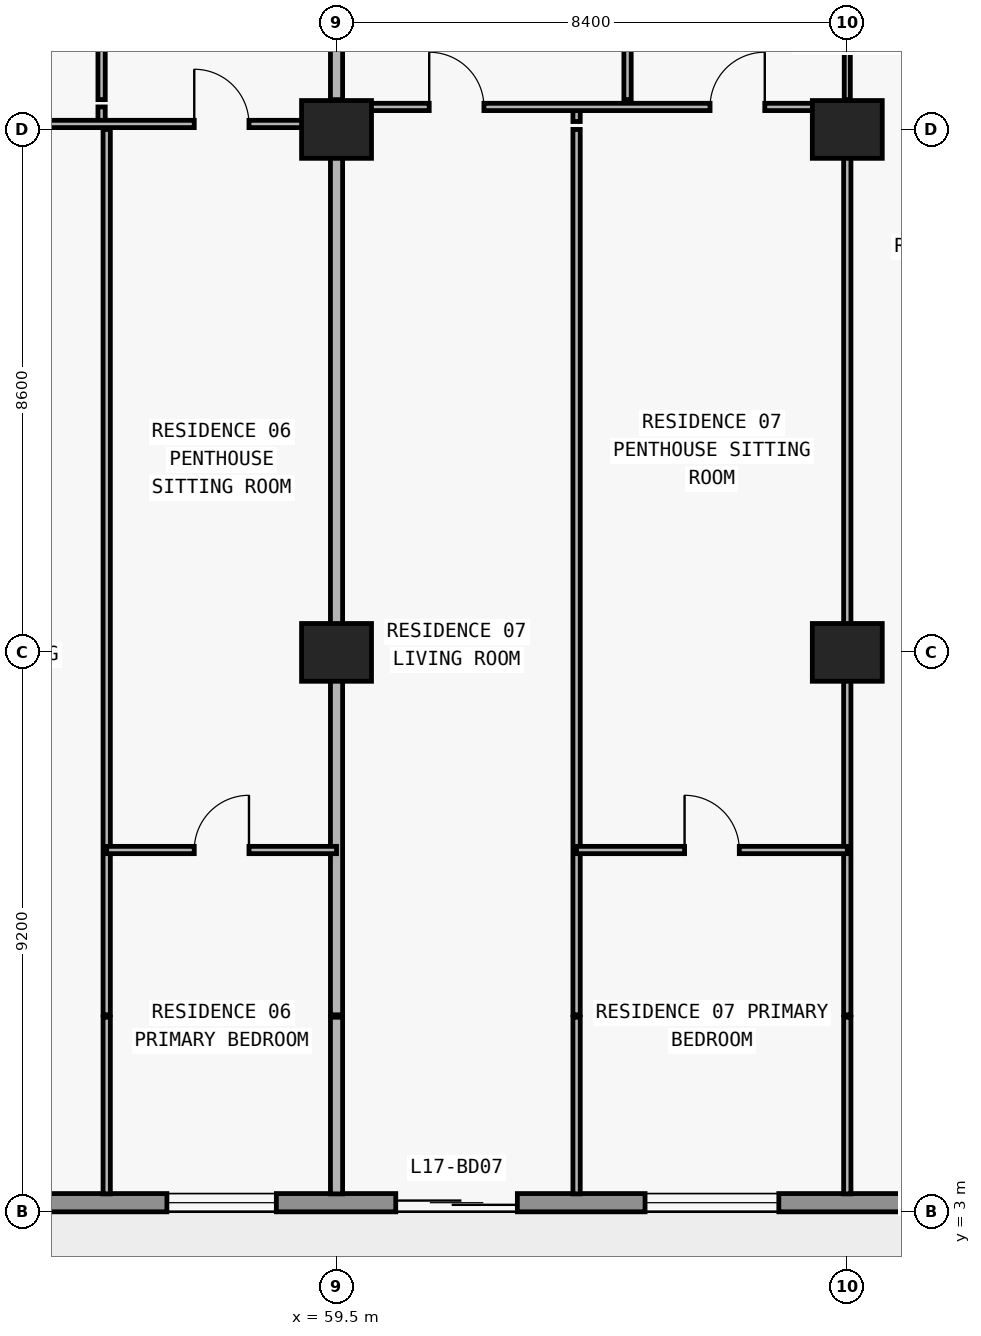
"""IFC4 building model, lengths in metres.
Left out: names, types, materials, properties, quantities, classifications, styles, units other than length and angle.
Written with IfcOpenShell. Run it as: python <this file> out.ifc"""

import sys

from ifc_helpers import new_model, si_unit, direction, frame, frame_2d, origin, origin_2d, place, context, subcontext, project, spatial, rectangle, extrude, element, fill, save


model = new_model("IFC4")
c1 = context("Model", 3, precision=1e-05, world=origin(), true_north=direction((0.0, 1.0)))
c2 = subcontext(c1, "Body", "Model", "MODEL_VIEW")
j1 = project(units=[si_unit("LENGTHUNIT", "METRE"), si_unit("PLANEANGLEUNIT", "RADIAN")], contexts=[c1])
p1 = place(None, origin())
s1 = spatial("IfcSite", under=j1, at=p1, CompositionType="ELEMENT")
p2 = place(p1, origin())
s2 = spatial("IfcBuilding", under=s1, at=p2, CompositionType="ELEMENT")
p3 = place(p2, frame((0.0, 0.0, 66.3)))
s3 = spatial("IfcBuildingStorey", under=s2, at=p3, CompositionType="ELEMENT", Elevation=66.3)
for number, where, z_axis, x_axis in (
    (1, (59.5, 12.2, 0.0), (0.0, 0.0, 1.0), (1.0, 0.0, 0.0)),
    (2, (67.9, 12.2, 0.0), (0.0, 0.0, 1.0), (1.0, 0.0, 0.0)),
    (3, (59.5, 20.8, 0.0), (0.0, 0.0, 1.0), (1.0, 0.0, 0.0)),
    (4, (67.9, 20.8, 0.0), (0.0, 0.0, 1.0), (1.0, 0.0, 0.0)),
):
    element("IfcColumn", number, at=place(p3, frame(where, z_axis=z_axis, x_axis=x_axis)), inside=s3, PredefinedType="COLUMN", context=c2, shape_type="SweptSolid", body=[
        extrude(rectangle(XDim=1.15, YDim=0.95, at=origin_2d()), origin(), (0.0, 0.0, 1.0), 3.05),
    ])
p4 = place(p3, frame((72.7, 3.15, 0.0), z_axis=(0.0, 0.0, 1.0), x_axis=(-1.0, 0.0, 0.0)))
e5 = element("IfcWall", 5, at=p4, inside=s3, PredefinedType="STANDARD", context=c2, shape_type="SweptSolid", body=[
    extrude(rectangle(XDim=67.6, YDim=0.3, at=frame_2d((33.8, 0.0))), origin(), (0.0, 0.0, 1.0), 3.05),
])
p5 = place(p4, frame((59.826, 0.0, 0.0)))
e6 = element("IfcOpeningElement", 6, at=p5, cuts=e5, PredefinedType="OPENING", context=c2, shape_type="SweptSolid", body=[
    extrude(rectangle(XDim=2.0, YDim=2.3, at=frame_2d((1.0, 1.15))), frame((0.0, 0.16, 0.0), z_axis=(0.0, -1.0, 0.0), x_axis=(1.0, 0.0, 0.0)), (0.0, 0.0, 1.0), 0.32),
])
p6 = place(p4, frame((55.526, 0.0, 0.85)))
e7 = element("IfcOpeningElement", 7, at=p6, cuts=e5, PredefinedType="OPENING", context=c2, shape_type="SweptSolid", body=[
    extrude(rectangle(XDim=2.2, YDim=1.55, at=frame_2d((1.1, 0.775))), frame((0.0, 0.16, 0.0), z_axis=(0.0, -1.0, 0.0), x_axis=(1.0, 0.0, 0.0)), (0.0, 0.0, 1.0), 0.32),
])
p7 = place(p4, frame((51.09, 0.0, 0.0)))
e8 = element("IfcOpeningElement", 8, at=p7, cuts=e5, PredefinedType="OPENING", context=c2, shape_type="SweptSolid", body=[
    extrude(rectangle(XDim=2.0, YDim=2.3, at=frame_2d((1.0, 1.15))), frame((0.0, 0.16, 0.0), z_axis=(0.0, -1.0, 0.0), x_axis=(1.0, 0.0, 0.0)), (0.0, 0.0, 1.0), 0.32),
])
p8 = place(p4, frame((46.99, 0.0, 0.85)))
e9 = element("IfcOpeningElement", 9, at=p8, cuts=e5, PredefinedType="OPENING", context=c2, shape_type="SweptSolid", body=[
    extrude(rectangle(XDim=1.8, YDim=1.55, at=frame_2d((0.9, 0.775))), frame((0.0, 0.16, 0.0), z_axis=(0.0, -1.0, 0.0), x_axis=(1.0, 0.0, 0.0)), (0.0, 0.0, 1.0), 0.32),
])
p9 = place(p4, frame((43.026, 0.0, 0.0)))
e10 = element("IfcOpeningElement", 10, at=p9, cuts=e5, PredefinedType="OPENING", context=c2, shape_type="SweptSolid", body=[
    extrude(rectangle(XDim=2.0, YDim=2.3, at=frame_2d((1.0, 1.15))), frame((0.0, 0.16, 0.0), z_axis=(0.0, -1.0, 0.0), x_axis=(1.0, 0.0, 0.0)), (0.0, 0.0, 1.0), 0.32),
])
p10 = place(p4, frame((38.726, 0.0, 0.85)))
e11 = element("IfcOpeningElement", 11, at=p10, cuts=e5, PredefinedType="OPENING", context=c2, shape_type="SweptSolid", body=[
    extrude(rectangle(XDim=2.2, YDim=1.55, at=frame_2d((1.1, 0.775))), frame((0.0, 0.16, 0.0), z_axis=(0.0, -1.0, 0.0), x_axis=(1.0, 0.0, 0.0)), (0.0, 0.0, 1.0), 0.32),
])
p11 = place(p4, frame((34.51, 0.0, 0.0)))
e12 = element("IfcOpeningElement", 12, at=p11, cuts=e5, PredefinedType="OPENING", context=c2, shape_type="SweptSolid", body=[
    extrude(rectangle(XDim=2.0, YDim=2.3, at=frame_2d((1.0, 1.15))), frame((0.0, 0.16, 0.0), z_axis=(0.0, -1.0, 0.0), x_axis=(1.0, 0.0, 0.0)), (0.0, 0.0, 1.0), 0.32),
])
p12 = place(p4, frame((30.81, 0.0, 0.85)))
e13 = element("IfcOpeningElement", 13, at=p12, cuts=e5, PredefinedType="OPENING", context=c2, shape_type="SweptSolid", body=[
    extrude(rectangle(XDim=1.8, YDim=1.55, at=frame_2d((0.9, 0.775))), frame((0.0, 0.16, 0.0), z_axis=(0.0, -1.0, 0.0), x_axis=(1.0, 0.0, 0.0)), (0.0, 0.0, 1.0), 0.32),
])
p13 = place(p4, frame((27.026, 0.0, 0.0)))
e14 = element("IfcOpeningElement", 14, at=p13, cuts=e5, PredefinedType="OPENING", context=c2, shape_type="SweptSolid", body=[
    extrude(rectangle(XDim=2.0, YDim=2.3, at=frame_2d((1.0, 1.15))), frame((0.0, 0.16, 0.0), z_axis=(0.0, -1.0, 0.0), x_axis=(1.0, 0.0, 0.0)), (0.0, 0.0, 1.0), 0.32),
])
p14 = place(p4, frame((22.726, 0.0, 0.85)))
e15 = element("IfcOpeningElement", 15, at=p14, cuts=e5, PredefinedType="OPENING", context=c2, shape_type="SweptSolid", body=[
    extrude(rectangle(XDim=2.2, YDim=1.55, at=frame_2d((1.1, 0.775))), frame((0.0, 0.16, 0.0), z_axis=(0.0, -1.0, 0.0), x_axis=(1.0, 0.0, 0.0)), (0.0, 0.0, 1.0), 0.32),
])
p15 = place(p4, frame((18.29, 0.0, 0.0)))
e16 = element("IfcOpeningElement", 16, at=p15, cuts=e5, PredefinedType="OPENING", context=c2, shape_type="SweptSolid", body=[
    extrude(rectangle(XDim=2.0, YDim=2.3, at=frame_2d((1.0, 1.15))), frame((0.0, 0.16, 0.0), z_axis=(0.0, -1.0, 0.0), x_axis=(1.0, 0.0, 0.0)), (0.0, 0.0, 1.0), 0.32),
])
p16 = place(p4, frame((14.19, 0.0, 0.85)))
e17 = element("IfcOpeningElement", 17, at=p16, cuts=e5, PredefinedType="OPENING", context=c2, shape_type="SweptSolid", body=[
    extrude(rectangle(XDim=1.8, YDim=1.55, at=frame_2d((0.9, 0.775))), frame((0.0, 0.16, 0.0), z_axis=(0.0, -1.0, 0.0), x_axis=(1.0, 0.0, 0.0)), (0.0, 0.0, 1.0), 0.32),
])
p17 = place(p4, frame((10.226, 0.0, 0.0)))
e18 = element("IfcOpeningElement", 18, at=p17, cuts=e5, PredefinedType="OPENING", context=c2, shape_type="SweptSolid", body=[
    extrude(rectangle(XDim=2.0, YDim=2.3, at=frame_2d((1.0, 1.15))), frame((0.0, 0.16, 0.0), z_axis=(0.0, -1.0, 0.0), x_axis=(1.0, 0.0, 0.0)), (0.0, 0.0, 1.0), 0.32),
])
p18 = place(p4, frame((5.926, 0.0, 0.85)))
e19 = element("IfcOpeningElement", 19, at=p18, cuts=e5, PredefinedType="OPENING", context=c2, shape_type="SweptSolid", body=[
    extrude(rectangle(XDim=2.2, YDim=1.55, at=frame_2d((1.1, 0.775))), frame((0.0, 0.16, 0.0), z_axis=(0.0, -1.0, 0.0), x_axis=(1.0, 0.0, 0.0)), (0.0, 0.0, 1.0), 0.32),
])
p19 = place(p3, frame((55.636, 20.93, 0.0), z_axis=(0.0, 0.0, 1.0), x_axis=(0.0, 1.0, 0.0)))
e20 = element("IfcWall", 20, at=p19, inside=s3, PredefinedType="PARTITIONING", context=c2, shape_type="SweptSolid", body=[
    extrude(rectangle(XDim=0.24, YDim=0.12, at=frame_2d((0.12, 0.0))), origin(), (0.0, 0.0, 1.0), 3.05),
])
p20 = place(p3, frame((55.636, 21.29, 0.0), z_axis=(0.0, 0.0, 1.0), x_axis=(0.0, 1.0, 0.0)))
e21 = element("IfcWall", 21, at=p20, inside=s3, PredefinedType="PARTITIONING", context=c2, shape_type="SweptSolid", body=[
    extrude(rectangle(XDim=4.69, YDim=0.12, at=frame_2d((2.345, 0.0))), origin(), (0.0, 0.0, 1.0), 3.05),
])
p21 = place(p20, frame((1.895, 0.0, 0.0)))
e22 = element("IfcOpeningElement", 22, at=p21, cuts=e21, PredefinedType="OPENING", context=c2, shape_type="SweptSolid", body=[
    extrude(rectangle(XDim=0.9, YDim=2.15, at=frame_2d((0.45, 1.075))), frame((0.0, 0.07, 0.0), z_axis=(0.0, -1.0, 0.0), x_axis=(1.0, 0.0, 0.0)), (0.0, 0.0, 1.0), 0.14),
])
p22 = place(p3, frame((55.72, 3.295, 0.0), z_axis=(0.0, 0.0, 1.0), x_axis=(0.0, 1.0, 0.0)))
e23 = element("IfcWall", 23, at=p22, inside=s3, PredefinedType="PARTITIONING", context=c2, shape_type="SweptSolid", body=[
    extrude(rectangle(XDim=2.905, YDim=0.12, at=frame_2d((1.453, 0.0))), origin(), (0.0, 0.0, 1.0), 3.05),
])
p23 = place(p3, frame((55.72, 6.24, 0.0), z_axis=(0.0, 0.0, 1.0), x_axis=(0.0, 1.0, 0.0)))
e24 = element("IfcWall", 24, at=p23, inside=s3, PredefinedType="PARTITIONING", context=c2, shape_type="SweptSolid", body=[
    extrude(rectangle(XDim=14.56, YDim=0.12, at=frame_2d((7.28, 0.0))), origin(), (0.0, 0.0, 1.0), 3.05),
])
p24 = place(p3, frame((59.5, 3.295, 0.0), z_axis=(0.0, 0.0, 1.0), x_axis=(0.0, 1.0, 0.0)))
e25 = element("IfcWall", 25, at=p24, inside=s3, PredefinedType="PARTITIONING", context=c2, shape_type="SweptSolid", body=[
    extrude(rectangle(XDim=2.905, YDim=0.2, at=frame_2d((1.453, 0.0))), origin(), (0.0, 0.0, 1.0), 3.05),
])
p25 = place(p3, frame((59.5, 6.24, 0.0), z_axis=(0.0, 0.0, 1.0), x_axis=(0.0, 1.0, 0.0)))
e26 = element("IfcWall", 26, at=p25, inside=s3, PredefinedType="PARTITIONING", context=c2, shape_type="SweptSolid", body=[
    extrude(rectangle(XDim=14.56, YDim=0.2, at=frame_2d((7.28, 0.0))), origin(), (0.0, 0.0, 1.0), 2.11),
])
p26 = place(p3, frame((59.5, 20.93, 0.0), z_axis=(0.0, 0.0, 1.0), x_axis=(0.0, 1.0, 0.0)))
e27 = element("IfcWall", 27, at=p26, inside=s3, PredefinedType="PARTITIONING", context=c2, shape_type="SweptSolid", body=[
    extrude(rectangle(XDim=0.24, YDim=0.2, at=frame_2d((0.12, 0.0))), origin(), (0.0, 0.0, 1.0), 3.05),
])
p27 = place(p3, frame((59.5, 21.29, 0.0), z_axis=(0.0, 0.0, 1.0), x_axis=(0.0, 1.0, 0.0)))
e28 = element("IfcWall", 28, at=p27, inside=s3, PredefinedType="PARTITIONING", context=c2, shape_type="SweptSolid", body=[
    extrude(rectangle(XDim=4.69, YDim=0.2, at=frame_2d((2.345, 0.0))), origin(), (0.0, 0.0, 1.0), 2.11),
])
p28 = place(p3, frame((63.448, 3.295, 0.0), z_axis=(0.0, 0.0, 1.0), x_axis=(0.0, 1.0, 0.0)))
e29 = element("IfcWall", 29, at=p28, inside=s3, PredefinedType="PARTITIONING", context=c2, shape_type="SweptSolid", body=[
    extrude(rectangle(XDim=2.905, YDim=0.12, at=frame_2d((1.453, 0.0))), origin(), (0.0, 0.0, 1.0), 3.05),
])
p29 = place(p3, frame((63.448, 6.24, 0.0), z_axis=(0.0, 0.0, 1.0), x_axis=(0.0, 1.0, 0.0)))
e30 = element("IfcWall", 30, at=p29, inside=s3, PredefinedType="PARTITIONING", context=c2, shape_type="SweptSolid", body=[
    extrude(rectangle(XDim=14.56, YDim=0.12, at=frame_2d((7.28, 0.0))), origin(), (0.0, 0.0, 1.0), 2.423),
])
p30 = place(p3, frame((63.448, 20.93, 0.0), z_axis=(0.0, 0.0, 1.0), x_axis=(0.0, 1.0, 0.0)))
e31 = element("IfcWall", 31, at=p30, inside=s3, PredefinedType="PARTITIONING", context=c2, shape_type="SweptSolid", body=[
    extrude(rectangle(XDim=0.24, YDim=0.12, at=frame_2d((0.12, 0.0))), origin(), (0.0, 0.0, 1.0), 2.423),
])
p31 = place(p3, frame((64.286, 21.29, 0.0), z_axis=(0.0, 0.0, 1.0), x_axis=(0.0, 1.0, 0.0)))
e32 = element("IfcWall", 32, at=p31, inside=s3, PredefinedType="PARTITIONING", context=c2, shape_type="SweptSolid", body=[
    extrude(rectangle(XDim=4.69, YDim=0.12, at=frame_2d((2.345, 0.0))), origin(), (0.0, 0.0, 1.0), 3.05),
])
p32 = place(p31, frame((1.895, 0.0, 0.0)))
e33 = element("IfcOpeningElement", 33, at=p32, cuts=e32, PredefinedType="OPENING", context=c2, shape_type="SweptSolid", body=[
    extrude(rectangle(XDim=0.9, YDim=2.15, at=frame_2d((0.45, 1.075))), frame((0.0, 0.07, 0.0), z_axis=(0.0, -1.0, 0.0), x_axis=(1.0, 0.0, 0.0)), (0.0, 0.0, 1.0), 0.14),
])
p33 = place(p3, frame((67.9, 3.295, 0.0), z_axis=(0.0, 0.0, 1.0), x_axis=(0.0, 1.0, 0.0)))
e34 = element("IfcWall", 34, at=p33, inside=s3, PredefinedType="PARTITIONING", context=c2, shape_type="SweptSolid", body=[
    extrude(rectangle(XDim=2.905, YDim=0.12, at=frame_2d((1.453, 0.0))), origin(), (0.0, 0.0, 1.0), 3.05),
])
p34 = place(p3, frame((67.9, 6.24, 0.0), z_axis=(0.0, 0.0, 1.0), x_axis=(0.0, 1.0, 0.0)))
e35 = element("IfcWall", 35, at=p34, inside=s3, PredefinedType="PARTITIONING", context=c2, shape_type="SweptSolid", body=[
    extrude(rectangle(XDim=14.56, YDim=0.12, at=frame_2d((7.28, 0.0))), origin(), (0.0, 0.0, 1.0), 2.11),
])
p35 = place(p3, frame((67.9, 20.93, 0.0), z_axis=(0.0, 0.0, 1.0), x_axis=(0.0, 1.0, 0.0)))
e36 = element("IfcWall", 36, at=p35, inside=s3, PredefinedType="PARTITIONING", context=c2, shape_type="SweptSolid", body=[
    extrude(rectangle(XDim=0.24, YDim=0.12, at=frame_2d((0.12, 0.0))), origin(), (0.0, 0.0, 1.0), 3.05),
])
p36 = place(p3, frame((67.9, 21.29, 0.0), z_axis=(0.0, 0.0, 1.0), x_axis=(0.0, 1.0, 0.0)))
e37 = element("IfcWall", 37, at=p36, inside=s3, PredefinedType="MOVABLE", context=c2, shape_type="SweptSolid", body=[
    extrude(rectangle(XDim=4.69, YDim=0.1, at=frame_2d((2.345, 0.0))), origin(), (0.0, 0.0, 1.0), 2.11),
])
p37 = place(p36, frame((1.895, 0.0, 0.0)))
e38 = element("IfcOpeningElement", 38, at=p37, cuts=e37, PredefinedType="OPENING", context=c2, shape_type="SweptSolid", body=[
    extrude(rectangle(XDim=0.9, YDim=2.06, at=frame_2d((0.45, 1.03))), frame((0.0, 0.06, 0.0), z_axis=(0.0, -1.0, 0.0), x_axis=(1.0, 0.0, 0.0)), (0.0, 0.0, 1.0), 0.12),
])
p38 = place(p3, frame((55.72, 8.95, 0.0), z_axis=(0.0, 0.0, 1.0), x_axis=(1.0, 0.0, 0.0)))
e39 = element("IfcWall", 39, at=p38, inside=s3, PredefinedType="PARTITIONING", context=c2, shape_type="SweptSolid", body=[
    extrude(rectangle(XDim=3.78, YDim=0.12, at=frame_2d((1.89, 0.0))), origin(), (0.0, 0.0, 1.0), 3.05),
])
p39 = place(p38, frame((1.44, 0.0, 0.0)))
e40 = element("IfcOpeningElement", 40, at=p39, cuts=e39, PredefinedType="OPENING", context=c2, shape_type="SweptSolid", body=[
    extrude(rectangle(XDim=0.9, YDim=2.15, at=frame_2d((0.45, 1.075))), frame((0.0, 0.07, 0.0), z_axis=(0.0, -1.0, 0.0), x_axis=(1.0, 0.0, 0.0)), (0.0, 0.0, 1.0), 0.14),
])
p40 = place(p3, frame((63.448, 8.95, 0.0), z_axis=(0.0, 0.0, 1.0), x_axis=(1.0, 0.0, 0.0)))
e41 = element("IfcWall", 41, at=p40, inside=s3, PredefinedType="PARTITIONING", context=c2, shape_type="SweptSolid", body=[
    extrude(rectangle(XDim=4.452, YDim=0.12, at=frame_2d((2.226, 0.0))), origin(), (0.0, 0.0, 1.0), 3.05),
])
p41 = place(p40, frame((1.776, 0.0, 0.0)))
e42 = element("IfcOpeningElement", 42, at=p41, cuts=e41, PredefinedType="OPENING", context=c2, shape_type="SweptSolid", body=[
    extrude(rectangle(XDim=0.9, YDim=2.15, at=frame_2d((0.45, 1.075))), frame((0.0, 0.07, 0.0), z_axis=(0.0, -1.0, 0.0), x_axis=(1.0, 0.0, 0.0)), (0.0, 0.0, 1.0), 0.14),
])
p42 = place(p3, frame((51.37, 20.89, 0.0), z_axis=(0.0, 0.0, 1.0), x_axis=(1.0, 0.0, 0.0)))
e43 = element("IfcWall", 43, at=p42, inside=s3, PredefinedType="PARTITIONING", context=c2, shape_type="SweptSolid", body=[
    extrude(rectangle(XDim=8.13, YDim=0.12, at=frame_2d((4.065, 0.0))), origin(), (0.0, 0.0, 1.0), 2.11),
])
p43 = place(p42, frame((1.683, 0.0, 0.0)))
e44 = element("IfcOpeningElement", 44, at=p43, cuts=e43, PredefinedType="OPENING", context=c2, shape_type="SweptSolid", body=[
    extrude(rectangle(XDim=0.9, YDim=2.06, at=frame_2d((0.45, 1.03))), frame((0.0, 0.07, 0.0), z_axis=(0.0, -1.0, 0.0), x_axis=(1.0, 0.0, 0.0)), (0.0, 0.0, 1.0), 0.14),
])
p44 = place(p42, frame((5.79, 0.0, 0.0)))
e45 = element("IfcOpeningElement", 45, at=p44, cuts=e43, PredefinedType="OPENING", context=c2, shape_type="SweptSolid", body=[
    extrude(rectangle(XDim=0.9, YDim=2.06, at=frame_2d((0.45, 1.03))), frame((0.0, 0.07, 0.0), z_axis=(0.0, -1.0, 0.0), x_axis=(1.0, 0.0, 0.0)), (0.0, 0.0, 1.0), 0.14),
])
p45 = place(p3, frame((59.5, 21.17, 0.0), z_axis=(0.0, 0.0, 1.0), x_axis=(1.0, 0.0, 0.0)))
e46 = element("IfcWall", 46, at=p45, inside=s3, PredefinedType="PARTITIONING", context=c2, shape_type="SweptSolid", body=[
    extrude(rectangle(XDim=8.4, YDim=0.12, at=frame_2d((4.2, 0.0))), origin(), (0.0, 0.0, 1.0), 3.05),
])
p46 = place(p45, frame((1.524, 0.0, 0.0)))
e47 = element("IfcOpeningElement", 47, at=p46, cuts=e46, PredefinedType="OPENING", context=c2, shape_type="SweptSolid", body=[
    extrude(rectangle(XDim=0.9, YDim=2.15, at=frame_2d((0.45, 1.075))), frame((0.0, 0.07, 0.0), z_axis=(0.0, -1.0, 0.0), x_axis=(1.0, 0.0, 0.0)), (0.0, 0.0, 1.0), 0.14),
])
p47 = place(p45, frame((6.143, 0.0, 0.0)))
e48 = element("IfcOpeningElement", 48, at=p47, cuts=e46, PredefinedType="OPENING", context=c2, shape_type="SweptSolid", body=[
    extrude(rectangle(XDim=0.9, YDim=2.15, at=frame_2d((0.45, 1.075))), frame((0.0, 0.07, 0.0), z_axis=(0.0, -1.0, 0.0), x_axis=(1.0, 0.0, 0.0)), (0.0, 0.0, 1.0), 0.14),
])
p48 = place(p16, origin())
e49 = element("IfcWindow", 49, at=p48, inside=s3, PartitioningType="SINGLE_PANEL", PredefinedType="WINDOW", context=c2, shape_type="SweptSolid", body=[
    extrude(rectangle(XDim=1.8, YDim=1.55, at=frame_2d((0.9, 0.775))), frame((0.0, 0.03, 0.0), z_axis=(0.0, -1.0, 0.0), x_axis=(1.0, 0.0, 0.0)), (0.0, 0.0, 1.0), 0.06),
])
fill(e17, e49)
p49 = place(p17, origin())
e50 = element("IfcDoor", 50, at=p49, inside=s3, OperationType="DOUBLE_DOOR_SLIDING", PredefinedType="DOOR", context=c2, shape_type="SweptSolid", body=[
    extrude(rectangle(XDim=2.0, YDim=2.3, at=frame_2d((1.0, 1.15))), frame((0.0, 0.025, 0.0), z_axis=(0.0, -1.0, 0.0), x_axis=(1.0, 0.0, 0.0)), (0.0, 0.0, 1.0), 0.05),
])
fill(e18, e50)
p50 = place(p18, origin())
e51 = element("IfcWindow", 51, at=p50, inside=s3, PartitioningType="SINGLE_PANEL", PredefinedType="WINDOW", context=c2, shape_type="SweptSolid", body=[
    extrude(rectangle(XDim=2.2, YDim=1.55, at=frame_2d((1.1, 0.775))), frame((0.0, 0.03, 0.0), z_axis=(0.0, -1.0, 0.0), x_axis=(1.0, 0.0, 0.0)), (0.0, 0.0, 1.0), 0.06),
])
fill(e19, e51)
p51 = place(p44, origin())
e52 = element("IfcDoor", 52, at=p51, inside=s3, OperationType="SINGLE_SWING_LEFT", PredefinedType="DOOR", context=c2, shape_type="SweptSolid", body=[
    extrude(rectangle(XDim=0.9, YDim=2.06, at=frame_2d((0.45, 1.03))), frame((0.0, 0.025, 0.0), z_axis=(0.0, -1.0, 0.0), x_axis=(1.0, 0.0, 0.0)), (0.0, 0.0, 1.0), 0.05),
])
fill(e45, e52)
p52 = place(p39, origin())
e53 = element("IfcDoor", 53, at=p52, inside=s3, OperationType="SINGLE_SWING_RIGHT", PredefinedType="DOOR", context=c2, shape_type="SweptSolid", body=[
    extrude(rectangle(XDim=0.9, YDim=2.15, at=frame_2d((0.45, 1.075))), frame((0.0, 0.025, 0.0), z_axis=(0.0, -1.0, 0.0), x_axis=(1.0, 0.0, 0.0)), (0.0, 0.0, 1.0), 0.05),
])
fill(e40, e53)
p53 = place(p46, origin())
e54 = element("IfcDoor", 54, at=p53, inside=s3, OperationType="SINGLE_SWING_LEFT", PredefinedType="DOOR", context=c2, shape_type="SweptSolid", body=[
    extrude(rectangle(XDim=0.9, YDim=2.15, at=frame_2d((0.45, 1.075))), frame((0.0, 0.025, 0.0), z_axis=(0.0, -1.0, 0.0), x_axis=(1.0, 0.0, 0.0)), (0.0, 0.0, 1.0), 0.05),
])
fill(e47, e54)
p54 = place(p47, origin())
e55 = element("IfcDoor", 55, at=p54, inside=s3, OperationType="SINGLE_SWING_RIGHT", PredefinedType="DOOR", context=c2, shape_type="SweptSolid", body=[
    extrude(rectangle(XDim=0.9, YDim=2.15, at=frame_2d((0.45, 1.075))), frame((0.0, 0.025, 0.0), z_axis=(0.0, -1.0, 0.0), x_axis=(1.0, 0.0, 0.0)), (0.0, 0.0, 1.0), 0.05),
])
fill(e48, e55)
p55 = place(p41, origin())
e56 = element("IfcDoor", 56, at=p55, inside=s3, OperationType="SINGLE_SWING_LEFT", PredefinedType="DOOR", context=c2, shape_type="SweptSolid", body=[
    extrude(rectangle(XDim=0.9, YDim=2.15, at=frame_2d((0.45, 1.075))), frame((0.0, 0.025, 0.0), z_axis=(0.0, -1.0, 0.0), x_axis=(1.0, 0.0, 0.0)), (0.0, 0.0, 1.0), 0.05),
])
fill(e42, e56)
save(model, sys.argv[1])
